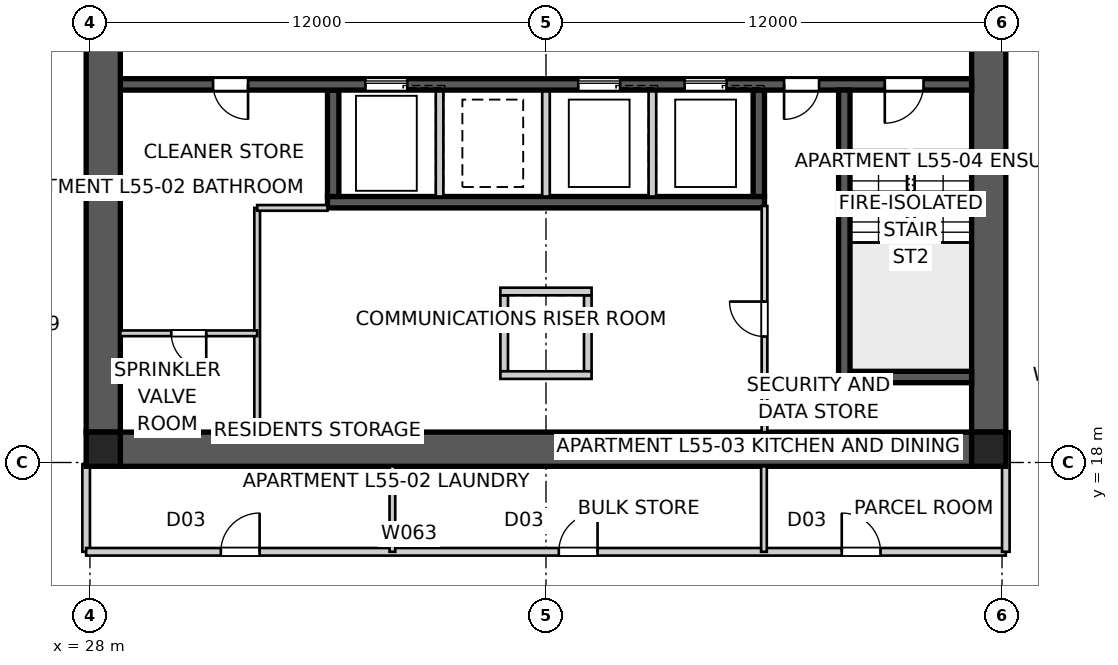
"""IFC4 building model, lengths in metres.
Left out: names, types, materials, properties, quantities, classifications, styles, units other than length and angle.
Written with IfcOpenShell. Run it as: python <this file> out.ifc"""

import sys

from ifc_helpers import new_model, si_unit, direction, frame, frame_2d, origin, origin_2d, place, context, subcontext, project, spatial, polyline, rectangle, outline, extrude, element, fill, save


model = new_model("IFC4")
c1 = context("Model", 3, precision=1e-05, world=origin(), true_north=direction((0.0, 1.0)))
c2 = subcontext(c1, "Body", "Model", "MODEL_VIEW")
j1 = project(units=[si_unit("LENGTHUNIT", "METRE"), si_unit("PLANEANGLEUNIT", "RADIAN")], contexts=[c1])
p1 = place(None, origin())
s1 = spatial("IfcSite", under=j1, at=p1, CompositionType="ELEMENT")
p2 = place(p1, origin())
s2 = spatial("IfcBuilding", under=s1, at=p2, CompositionType="ELEMENT")
p3 = place(p2, frame((0.0, 0.0, 199.8)))
s3 = spatial("IfcBuildingStorey", under=s2, at=p3, CompositionType="ELEMENT", Elevation=199.8)
p4 = place(p3, frame((51.2, 18.35, 0.0), z_axis=(0.0, 0.0, 1.0), x_axis=(-1.0, 0.0, 0.0)))
e1 = element("IfcWall", 1, at=p4, inside=s3, PredefinedType="SHEAR", context=c2, shape_type="SweptSolid", body=[
    extrude(outline(polyline([(0.0, -0.45), (22.4, -0.45), (22.4, -0.025), (22.85, -0.025), (22.85, 0.025), (22.4, 0.025), (22.4, 0.45), (0.0, 0.45), (0.0, 0.025), (-0.45, 0.025), (-0.45, -0.025), (0.0, -0.025), (0.0, -0.45)])), origin(), (0.0, 0.0, 1.0), 3.4),
])
p5 = place(p3, frame((51.65, 18.8, 0.0), z_axis=(0.0, 0.0, 1.0), x_axis=(0.0, 1.0, 0.0)))
e2 = element("IfcWall", 2, at=p5, inside=s3, PredefinedType="SHEAR", context=c2, shape_type="SweptSolid", body=[
    extrude(outline(polyline([(0.0, -0.45), (22.4, -0.45), (22.4, -0.025), (22.85, -0.025), (22.85, 0.025), (22.4, 0.025), (22.4, 0.45), (0.0, 0.45), (0.0, 0.025), (-0.45, 0.025), (-0.45, -0.025), (0.0, -0.025), (0.0, -0.45)])), origin(), (0.0, 0.0, 1.0), 3.4),
])
p6 = place(p5, frame((11.14, 0.0, 0.0)))
e3 = element("IfcOpeningElement", 3, at=p6, cuts=e2, PredefinedType="OPENING", context=c2, shape_type="SweptSolid", body=[
    extrude(rectangle(XDim=1.02, YDim=2.4, at=frame_2d((0.51, 1.2))), frame((0.0, 0.46, 0.0), z_axis=(0.0, -1.0, 0.0), x_axis=(1.0, 0.0, 0.0)), (0.0, 0.0, 1.0), 0.92),
])
p7 = place(p3, frame((28.35, 41.2, 0.0), z_axis=(0.0, 0.0, 1.0), x_axis=(0.0, -1.0, 0.0)))
e4 = element("IfcWall", 4, at=p7, inside=s3, PredefinedType="SHEAR", context=c2, shape_type="SweptSolid", body=[
    extrude(outline(polyline([(0.0, -0.45), (22.4, -0.45), (22.4, -0.025), (22.85, -0.025), (22.85, 0.025), (22.4, 0.025), (22.4, 0.45), (0.0, 0.45), (0.0, 0.025), (-0.45, 0.025), (-0.45, -0.025), (0.0, -0.025), (0.0, -0.45)])), origin(), (0.0, 0.0, 1.0), 3.4),
])
p8 = place(p7, frame((11.14, 0.0, 0.0)))
e5 = element("IfcOpeningElement", 5, at=p8, cuts=e4, PredefinedType="OPENING", context=c2, shape_type="SweptSolid", body=[
    extrude(rectangle(XDim=1.02, YDim=2.4, at=frame_2d((0.51, 1.2))), frame((0.0, 0.46, 0.0), z_axis=(0.0, -1.0, 0.0), x_axis=(1.0, 0.0, 0.0)), (0.0, 0.0, 1.0), 0.92),
])
p9 = place(p3, frame((51.2, 27.95, 0.0), z_axis=(0.0, 0.0, 1.0), x_axis=(-1.0, 0.0, 0.0)))
e6 = element("IfcWall", 6, at=p9, inside=s3, PredefinedType="SHEAR", context=c2, shape_type="SweptSolid", body=[
    extrude(rectangle(XDim=22.4, YDim=0.3, at=frame_2d((11.2, 0.0))), origin(), (0.0, 0.0, 1.0), 3.4),
])
p10 = place(p9, frame((19.04, 0.0, 0.0)))
e7 = element("IfcOpeningElement", 7, at=p10, cuts=e6, PredefinedType="OPENING", context=c2, shape_type="SweptSolid", body=[
    extrude(rectangle(XDim=0.92, YDim=2.1, at=frame_2d((0.46, 1.05))), frame((0.0, 0.16, 0.0), z_axis=(0.0, -1.0, 0.0), x_axis=(1.0, 0.0, 0.0)), (0.0, 0.0, 1.0), 0.32),
])
p11 = place(p9, frame((1.265, 0.0, 0.0)))
e8 = element("IfcOpeningElement", 8, at=p11, cuts=e6, PredefinedType="OPENING", context=c2, shape_type="SweptSolid", body=[
    extrude(rectangle(XDim=1.02, YDim=2.1, at=frame_2d((0.51, 1.05))), frame((0.0, 0.16, 0.0), z_axis=(0.0, -1.0, 0.0), x_axis=(1.0, 0.0, 0.0)), (0.0, 0.0, 1.0), 0.32),
])
p12 = place(p9, frame((4.015, 0.0, 0.0)))
e9 = element("IfcOpeningElement", 9, at=p12, cuts=e6, PredefinedType="OPENING", context=c2, shape_type="SweptSolid", body=[
    extrude(rectangle(XDim=0.92, YDim=2.1, at=frame_2d((0.46, 1.05))), frame((0.0, 0.16, 0.0), z_axis=(0.0, -1.0, 0.0), x_axis=(1.0, 0.0, 0.0)), (0.0, 0.0, 1.0), 0.32),
])
p13 = place(p9, frame((6.45, 0.0, 0.0)))
e10 = element("IfcOpeningElement", 10, at=p13, cuts=e6, PredefinedType="OPENING", context=c2, shape_type="SweptSolid", body=[
    extrude(rectangle(XDim=1.1, YDim=2.1, at=frame_2d((0.55, 1.05))), frame((0.0, 0.16, 0.0), z_axis=(0.0, -1.0, 0.0), x_axis=(1.0, 0.0, 0.0)), (0.0, 0.0, 1.0), 0.32),
])
p14 = place(p9, frame((9.25, 0.0, 0.0)))
e11 = element("IfcOpeningElement", 11, at=p14, cuts=e6, PredefinedType="OPENING", context=c2, shape_type="SweptSolid", body=[
    extrude(rectangle(XDim=1.1, YDim=2.1, at=frame_2d((0.55, 1.05))), frame((0.0, 0.16, 0.0), z_axis=(0.0, -1.0, 0.0), x_axis=(1.0, 0.0, 0.0)), (0.0, 0.0, 1.0), 0.32),
])
p15 = place(p9, frame((14.85, 0.0, 0.0)))
e12 = element("IfcOpeningElement", 12, at=p15, cuts=e6, PredefinedType="OPENING", context=c2, shape_type="SweptSolid", body=[
    extrude(rectangle(XDim=1.1, YDim=2.1, at=frame_2d((0.55, 1.05))), frame((0.0, 0.16, 0.0), z_axis=(0.0, -1.0, 0.0), x_axis=(1.0, 0.0, 0.0)), (0.0, 0.0, 1.0), 0.32),
])
p16 = place(p3, frame((45.75, 24.85, 0.0), z_axis=(0.0, 0.0, 1.0), x_axis=(-1.0, 0.0, 0.0)))
e13 = element("IfcWall", 13, at=p16, inside=s3, PredefinedType="SHEAR", context=c2, shape_type="SweptSolid", body=[
    extrude(rectangle(XDim=11.5, YDim=0.3, at=frame_2d((5.75, 0.0))), origin(), (0.0, 0.0, 1.0), 3.4),
])
p17 = place(p3, frame((45.6, 27.8, 0.0), z_axis=(0.0, 0.0, 1.0), x_axis=(0.0, -1.0, 0.0)))
e14 = element("IfcWall", 14, at=p17, inside=s3, PredefinedType="SHEAR", context=c2, shape_type="SweptSolid", body=[
    extrude(rectangle(XDim=2.8, YDim=0.3, at=frame_2d((1.4, 0.0))), origin(), (0.0, 0.0, 1.0), 3.4),
])
for number, where, z_axis, x_axis in (
    (15, (42.8, 27.8, 0.0), (0.0, 0.0, 1.0), (0.0, -1.0, 0.0)),
    (16, (40.0, 27.8, 0.0), (0.0, 0.0, 1.0), (0.0, -1.0, 0.0)),
    (17, (37.2, 27.8, 0.0), (0.0, 0.0, 1.0), (0.0, -1.0, 0.0)),
):
    element("IfcWall", number, at=place(p3, frame(where, z_axis=z_axis, x_axis=x_axis)), inside=s3, PredefinedType="SOLIDWALL", context=c2, shape_type="SweptSolid", body=[
        extrude(rectangle(XDim=2.8, YDim=0.2, at=frame_2d((1.4, 0.0))), origin(), (0.0, 0.0, 1.0), 3.4),
    ])
p18 = place(p3, frame((34.4, 27.8, 0.0), z_axis=(0.0, 0.0, 1.0), x_axis=(0.0, -1.0, 0.0)))
e18 = element("IfcWall", 18, at=p18, inside=s3, PredefinedType="SHEAR", context=c2, shape_type="SweptSolid", body=[
    extrude(rectangle(XDim=2.8, YDim=0.3, at=frame_2d((1.4, 0.0))), origin(), (0.0, 0.0, 1.0), 3.4),
])
p19 = place(p3, frame((47.85, 27.8, 0.0), z_axis=(0.0, 0.0, 1.0), x_axis=(0.0, -1.0, 0.0)))
e19 = element("IfcWall", 19, at=p19, inside=s3, PredefinedType="SHEAR", context=c2, shape_type="SweptSolid", body=[
    extrude(rectangle(XDim=7.7, YDim=0.3, at=frame_2d((3.85, 0.0))), origin(), (0.0, 0.0, 1.0), 3.4),
])
p20 = place(p3, frame((51.2, 20.25, 0.0), z_axis=(0.0, 0.0, 1.0), x_axis=(-1.0, 0.0, 0.0)))
e20 = element("IfcWall", 20, at=p20, inside=s3, PredefinedType="SHEAR", context=c2, shape_type="SweptSolid", body=[
    extrude(rectangle(XDim=3.5, YDim=0.3, at=frame_2d((1.75, 0.0))), origin(), (0.0, 0.0, 1.0), 3.4),
])
for number, where, z_axis, x_axis in (
    (21, (38.9, 22.4, 0.0), (0.0, 0.0, 1.0), (0.0, -1.0, 0.0)),
    (22, (41.1, 22.4, 0.0), (0.0, 0.0, 1.0), (0.0, -1.0, 0.0)),
):
    element("IfcWall", number, at=place(p3, frame(where, z_axis=z_axis, x_axis=x_axis)), inside=s3, PredefinedType="SOLIDWALL", context=c2, shape_type="SweptSolid", body=[
        extrude(rectangle(XDim=2.0, YDim=0.2, at=frame_2d((1.0, 0.0))), origin(), (0.0, 0.0, 1.0), 3.4),
    ])
for number, where, z_axis, x_axis in (
    (23, (38.8, 22.5, 0.0), (0.0, 0.0, 1.0), (1.0, 0.0, 0.0)),
    (24, (38.8, 20.3, 0.0), (0.0, 0.0, 1.0), (1.0, 0.0, 0.0)),
):
    element("IfcWall", number, at=place(p3, frame(where, z_axis=z_axis, x_axis=x_axis)), inside=s3, PredefinedType="SOLIDWALL", context=c2, shape_type="SweptSolid", body=[
        extrude(rectangle(XDim=2.4, YDim=0.2, at=frame_2d((1.2, 0.0))), origin(), (0.0, 0.0, 1.0), 3.4),
    ])
for number, where, z_axis, x_axis in (
    (25, (28.35, 18.35, 0.0), (0.0, 0.0, 1.0), (1.0, 0.0, 0.0)),
    (26, (51.65, 18.35, 0.0), (0.0, 0.0, 1.0), (1.0, 0.0, 0.0)),
):
    element("IfcColumn", number, at=place(p3, frame(where, z_axis=z_axis, x_axis=x_axis)), inside=s3, PredefinedType="COLUMN", context=c2, shape_type="SweptSolid", body=[
        extrude(rectangle(XDim=0.9, YDim=0.9, at=origin_2d()), origin(), (0.0, 0.0, 1.0), 3.4),
    ])
p21 = place(p3, frame((45.75, 18.8, 0.0), z_axis=(0.0, 0.0, 1.0), x_axis=(0.0, 1.0, 0.0)))
e27 = element("IfcWall", 27, at=p21, inside=s3, PredefinedType="SOLIDWALL", context=c2, shape_type="SweptSolid", body=[
    extrude(rectangle(XDim=5.95, YDim=0.15, at=frame_2d((2.975, 0.0))), origin(), (0.0, 0.0, 1.0), 3.2),
])
p22 = place(p21, frame((2.515, 0.0, 0.0)))
e28 = element("IfcOpeningElement", 28, at=p22, cuts=e27, PredefinedType="OPENING", context=c2, shape_type="SweptSolid", body=[
    extrude(rectangle(XDim=0.92, YDim=2.1, at=frame_2d((0.46, 1.05))), frame((0.0, 0.085, 0.0), z_axis=(0.0, -1.0, 0.0), x_axis=(1.0, 0.0, 0.0)), (0.0, 0.0, 1.0), 0.17),
])
p23 = place(p3, frame((32.4, 18.8, 0.0), z_axis=(0.0, 0.0, 1.0), x_axis=(0.0, 1.0, 0.0)))
e29 = element("IfcWall", 29, at=p23, inside=s3, PredefinedType="SOLIDWALL", context=c2, shape_type="SweptSolid", body=[
    extrude(rectangle(XDim=5.9, YDim=0.15, at=frame_2d((2.95, 0.0))), origin(), (0.0, 0.0, 1.0), 3.2),
])
p24 = place(p3, frame((32.4, 24.7, 0.0), z_axis=(0.0, 0.0, 1.0), x_axis=(1.0, 0.0, 0.0)))
e30 = element("IfcWall", 30, at=p24, inside=s3, PredefinedType="SOLIDWALL", context=c2, shape_type="SweptSolid", body=[
    extrude(rectangle(XDim=1.85, YDim=0.15, at=frame_2d((0.925, 0.0))), origin(), (0.0, 0.0, 1.0), 3.2),
])
p25 = place(p3, frame((32.4, 21.4, 0.0), z_axis=(0.0, 0.0, 1.0), x_axis=(-1.0, 0.0, 0.0)))
e31 = element("IfcWall", 31, at=p25, inside=s3, PredefinedType="SOLIDWALL", context=c2, shape_type="SweptSolid", body=[
    extrude(rectangle(XDim=3.6, YDim=0.15, at=frame_2d((1.8, 0.0))), origin(), (0.0, 0.0, 1.0), 3.2),
])
p26 = place(p25, frame((1.34, 0.0, 0.0)))
e32 = element("IfcOpeningElement", 32, at=p26, cuts=e31, PredefinedType="OPENING", context=c2, shape_type="SweptSolid", body=[
    extrude(rectangle(XDim=0.92, YDim=2.1, at=frame_2d((0.46, 1.05))), frame((0.0, 0.085, 0.0), z_axis=(0.0, -1.0, 0.0), x_axis=(1.0, 0.0, 0.0)), (0.0, 0.0, 1.0), 0.17),
])
p27 = place(p3, frame((27.9, 17.95, 0.0), z_axis=(0.0, 0.0, 1.0), x_axis=(0.0, -1.0, 0.0)))
e33 = element("IfcWall", 33, at=p27, inside=s3, PredefinedType="PARTITIONING", context=c2, shape_type="SweptSolid", body=[
    extrude(rectangle(XDim=2.3, YDim=0.2, at=frame_2d((1.15, 0.0))), origin(), (0.0, 0.0, 1.0), 3.2),
])
p28 = place(p3, frame((27.9, 15.65, 0.0), z_axis=(0.0, 0.0, 1.0), x_axis=(1.0, 0.0, 0.0)))
e34 = element("IfcWall", 34, at=p28, inside=s3, PredefinedType="PARTITIONING", context=c2, shape_type="SweptSolid", body=[
    extrude(rectangle(XDim=24.2, YDim=0.2, at=frame_2d((12.1, 0.0))), origin(), (0.0, 0.0, 1.0), 3.2),
])
p29 = place(p28, frame((12.437, 0.0, 0.0)))
e35 = element("IfcOpeningElement", 35, at=p29, cuts=e34, PredefinedType="OPENING", context=c2, shape_type="SweptSolid", body=[
    extrude(rectangle(XDim=1.02, YDim=2.1, at=frame_2d((0.51, 1.05))), frame((0.0, 0.11, 0.0), z_axis=(0.0, -1.0, 0.0), x_axis=(1.0, 0.0, 0.0)), (0.0, 0.0, 1.0), 0.22),
])
p30 = place(p28, frame((3.544, 0.0, 0.0)))
e36 = element("IfcOpeningElement", 36, at=p30, cuts=e34, PredefinedType="OPENING", context=c2, shape_type="SweptSolid", body=[
    extrude(rectangle(XDim=1.02, YDim=2.1, at=frame_2d((0.51, 1.05))), frame((0.0, 0.11, 0.0), z_axis=(0.0, -1.0, 0.0), x_axis=(1.0, 0.0, 0.0)), (0.0, 0.0, 1.0), 0.22),
])
p31 = place(p28, frame((19.883, 0.0, 0.0)))
e37 = element("IfcOpeningElement", 37, at=p31, cuts=e34, PredefinedType="OPENING", context=c2, shape_type="SweptSolid", body=[
    extrude(rectangle(XDim=1.02, YDim=2.1, at=frame_2d((0.51, 1.05))), frame((0.0, 0.11, 0.0), z_axis=(0.0, -1.0, 0.0), x_axis=(1.0, 0.0, 0.0)), (0.0, 0.0, 1.0), 0.22),
])
p32 = place(p3, frame((52.1, 15.65, 0.0), z_axis=(0.0, 0.0, 1.0), x_axis=(0.0, 1.0, 0.0)))
e38 = element("IfcWall", 38, at=p32, inside=s3, PredefinedType="PARTITIONING", context=c2, shape_type="SweptSolid", body=[
    extrude(rectangle(XDim=3.17, YDim=0.2, at=frame_2d((1.585, 0.0))), origin(), (0.0, 0.0, 1.0), 3.2),
])
p33 = place(p3, frame((35.958, 15.65, 0.0), z_axis=(0.0, 0.0, 1.0), x_axis=(0.0, 1.0, 0.0)))
e39 = element("IfcWall", 39, at=p33, inside=s3, PredefinedType="SOLIDWALL", context=c2, shape_type="SweptSolid", body=[
    extrude(rectangle(XDim=2.25, YDim=0.15, at=frame_2d((1.125, 0.0))), origin(), (0.0, 0.0, 1.0), 3.2),
])
p34 = place(p3, frame((45.735, 15.65, 0.0), z_axis=(0.0, 0.0, 1.0), x_axis=(0.0, 1.0, 0.0)))
e40 = element("IfcWall", 40, at=p34, inside=s3, PredefinedType="SOLIDWALL", context=c2, shape_type="SweptSolid", body=[
    extrude(rectangle(XDim=2.25, YDim=0.15, at=frame_2d((1.125, 0.0))), origin(), (0.0, 0.0, 1.0), 2.671),
])
p35 = place(p10, origin())
e41 = element("IfcDoor", 41, at=p35, inside=s3, OperationType="SINGLE_SWING_LEFT", PredefinedType="DOOR", context=c2, shape_type="SweptSolid", body=[
    extrude(rectangle(XDim=0.92, YDim=2.1, at=frame_2d((0.46, 1.05))), frame((0.0, 0.025, 0.0), z_axis=(0.0, -1.0, 0.0), x_axis=(1.0, 0.0, 0.0)), (0.0, 0.0, 1.0), 0.05),
])
fill(e7, e41)
p36 = place(p11, origin())
e42 = element("IfcDoor", 42, at=p36, inside=s3, OperationType="SINGLE_SWING_RIGHT", PredefinedType="DOOR", context=c2, shape_type="SweptSolid", body=[
    extrude(rectangle(XDim=1.02, YDim=2.1, at=frame_2d((0.51, 1.05))), frame((0.0, 0.025, 0.0), z_axis=(0.0, -1.0, 0.0), x_axis=(1.0, 0.0, 0.0)), (0.0, 0.0, 1.0), 0.05),
])
fill(e8, e42)
p37 = place(p12, origin())
e43 = element("IfcDoor", 43, at=p37, inside=s3, OperationType="SINGLE_SWING_RIGHT", PredefinedType="DOOR", context=c2, shape_type="SweptSolid", body=[
    extrude(rectangle(XDim=0.92, YDim=2.1, at=frame_2d((0.46, 1.05))), frame((0.0, 0.025, 0.0), z_axis=(0.0, -1.0, 0.0), x_axis=(1.0, 0.0, 0.0)), (0.0, 0.0, 1.0), 0.05),
])
fill(e9, e43)
p38 = place(p29, origin())
e44 = element("IfcDoor", 44, at=p38, inside=s3, OperationType="SINGLE_SWING_RIGHT", PredefinedType="DOOR", context=c2, shape_type="SweptSolid", body=[
    extrude(rectangle(XDim=1.02, YDim=2.1, at=frame_2d((0.51, 1.05))), frame((0.0, 0.025, 0.0), z_axis=(0.0, -1.0, 0.0), x_axis=(1.0, 0.0, 0.0)), (0.0, 0.0, 1.0), 0.05),
])
fill(e35, e44)
p39 = place(p30, origin())
e45 = element("IfcDoor", 45, at=p39, inside=s3, OperationType="SINGLE_SWING_RIGHT", PredefinedType="DOOR", context=c2, shape_type="SweptSolid", body=[
    extrude(rectangle(XDim=1.02, YDim=2.1, at=frame_2d((0.51, 1.05))), frame((0.0, 0.025, 0.0), z_axis=(0.0, -1.0, 0.0), x_axis=(1.0, 0.0, 0.0)), (0.0, 0.0, 1.0), 0.05),
])
fill(e36, e45)
p40 = place(p31, origin())
e46 = element("IfcDoor", 46, at=p40, inside=s3, OperationType="SINGLE_SWING_LEFT", PredefinedType="DOOR", context=c2, shape_type="SweptSolid", body=[
    extrude(rectangle(XDim=1.02, YDim=2.1, at=frame_2d((0.51, 1.05))), frame((0.0, 0.025, 0.0), z_axis=(0.0, -1.0, 0.0), x_axis=(1.0, 0.0, 0.0)), (0.0, 0.0, 1.0), 0.05),
])
fill(e37, e46)
p41 = place(p26, origin())
e47 = element("IfcDoor", 47, at=p41, inside=s3, OperationType="SINGLE_SWING_LEFT", PredefinedType="DOOR", context=c2, shape_type="SweptSolid", body=[
    extrude(rectangle(XDim=0.92, YDim=2.1, at=frame_2d((0.46, 1.05))), frame((0.0, 0.025, 0.0), z_axis=(0.0, -1.0, 0.0), x_axis=(1.0, 0.0, 0.0)), (0.0, 0.0, 1.0), 0.05),
])
fill(e32, e47)
p42 = place(p22, origin())
e48 = element("IfcDoor", 48, at=p42, inside=s3, OperationType="SINGLE_SWING_RIGHT", PredefinedType="DOOR", context=c2, shape_type="SweptSolid", body=[
    extrude(rectangle(XDim=0.92, YDim=2.1, at=frame_2d((0.46, 1.05))), frame((0.0, 0.025, 0.0), z_axis=(0.0, -1.0, 0.0), x_axis=(1.0, 0.0, 0.0)), (0.0, 0.0, 1.0), 0.05),
])
fill(e28, e48)
p43 = place(p13, origin())
e49 = element("IfcDoor", 49, at=p43, inside=s3, OperationType="SLIDING_TO_LEFT", PredefinedType="DOOR", context=c2, shape_type="SweptSolid", body=[
    extrude(rectangle(XDim=1.1, YDim=2.1, at=frame_2d((0.55, 1.05))), frame((0.0, 0.025, 0.0), z_axis=(0.0, -1.0, 0.0), x_axis=(1.0, 0.0, 0.0)), (0.0, 0.0, 1.0), 0.05),
])
fill(e10, e49)
p44 = place(p14, origin())
e50 = element("IfcDoor", 50, at=p44, inside=s3, OperationType="SLIDING_TO_LEFT", PredefinedType="DOOR", context=c2, shape_type="SweptSolid", body=[
    extrude(rectangle(XDim=1.1, YDim=2.1, at=frame_2d((0.55, 1.05))), frame((0.0, 0.025, 0.0), z_axis=(0.0, -1.0, 0.0), x_axis=(1.0, 0.0, 0.0)), (0.0, 0.0, 1.0), 0.05),
])
fill(e11, e50)
p45 = place(p15, origin())
e51 = element("IfcDoor", 51, at=p45, inside=s3, OperationType="SLIDING_TO_LEFT", PredefinedType="DOOR", context=c2, shape_type="SweptSolid", body=[
    extrude(rectangle(XDim=1.1, YDim=2.1, at=frame_2d((0.55, 1.05))), frame((0.0, 0.025, 0.0), z_axis=(0.0, -1.0, 0.0), x_axis=(1.0, 0.0, 0.0)), (0.0, 0.0, 1.0), 0.05),
])
fill(e12, e51)
save(model, sys.argv[1])
